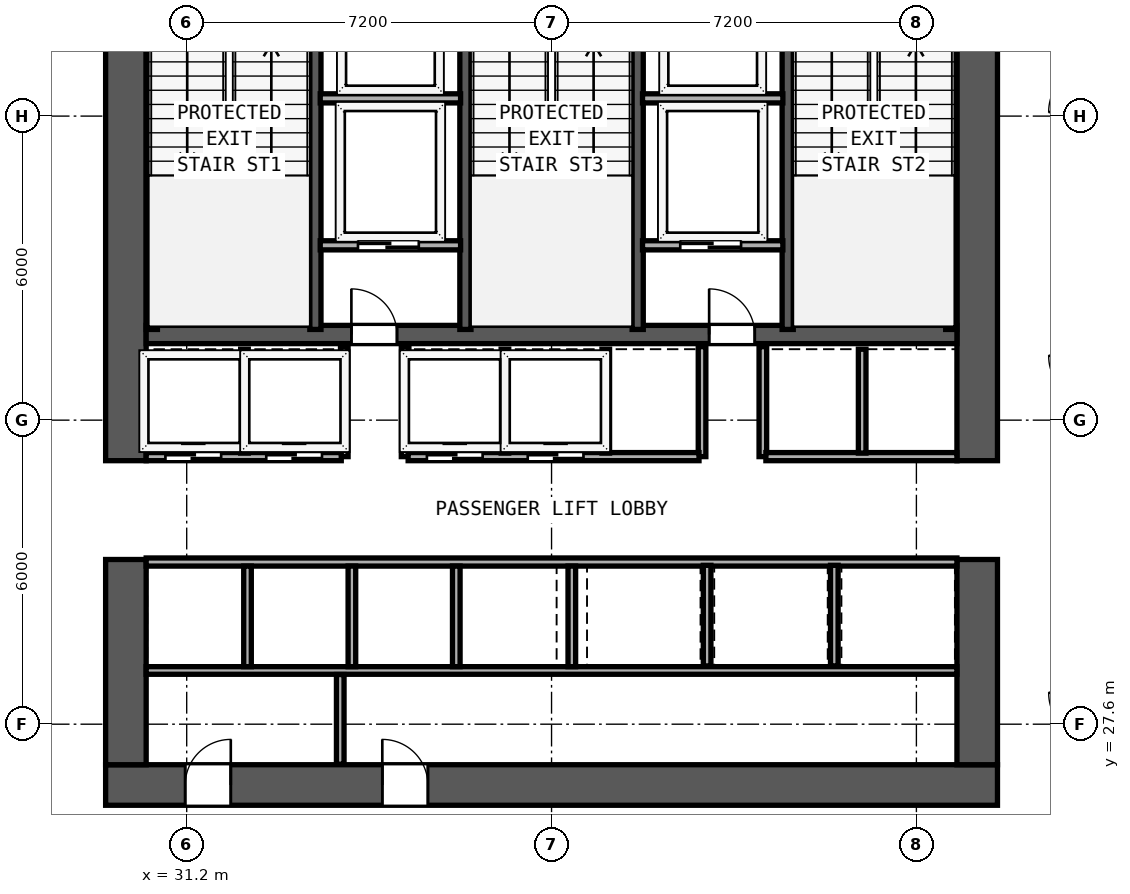
"""IFC4 building model, lengths in metres.
Left out: names, types, materials, properties, quantities, classifications, styles, units other than length and angle.
Written with IfcOpenShell. Run it as: python <this file> out.ifc"""

import sys

from ifc_helpers import new_model, si_unit, direction, frame, frame_2d, origin, place, context, subcontext, project, spatial, rectangle, extrude, element, fill, save


model = new_model("IFC4")
c1 = context("Model", 3, precision=1e-05, world=origin(), true_north=direction((0.0, 1.0)))
c2 = subcontext(c1, "Body", "Model", "MODEL_VIEW")
j1 = project(units=[si_unit("LENGTHUNIT", "METRE"), si_unit("PLANEANGLEUNIT", "RADIAN")], contexts=[c1])
p1 = place(None, origin())
s1 = spatial("IfcSite", under=j1, at=p1, CompositionType="ELEMENT")
p2 = place(p1, origin())
s2 = spatial("IfcBuilding", under=s1, at=p2, CompositionType="ELEMENT")
p3 = place(p2, frame((0.0, 0.0, 59.0)))
s3 = spatial("IfcBuildingStorey", under=s2, at=p3, CompositionType="ELEMENT", Elevation=59.0)
p4 = place(p3, frame((29.6, 26.4, 0.0), z_axis=(0.0, 0.0, 1.0), x_axis=(1.0, 0.0, 0.0)))
e1 = element("IfcWall", 1, at=p4, inside=s3, PredefinedType="SHEAR", context=c2, shape_type="SweptSolid", body=[
    extrude(rectangle(XDim=17.6, YDim=0.8, at=frame_2d((8.8, 0.0))), origin(), (0.0, 0.0, 1.0), 3.6),
])
p5 = place(p4, frame((2.47, 0.0, 0.0), z_axis=(0.0, 0.0, 1.0), x_axis=(-1.0, 0.0, 0.0)))
e2 = element("IfcOpeningElement", 2, at=p5, cuts=e1, PredefinedType="OPENING", context=c2, shape_type="SweptSolid", body=[
    extrude(rectangle(XDim=0.9, YDim=2.1, at=frame_2d((0.45, 1.05))), frame((0.0, 0.41, 0.0), z_axis=(0.0, -1.0, 0.0), x_axis=(1.0, 0.0, 0.0)), (0.0, 0.0, 1.0), 0.82),
])
p6 = place(p4, frame((6.36, 0.0, 0.0), z_axis=(0.0, 0.0, 1.0), x_axis=(-1.0, 0.0, 0.0)))
e3 = element("IfcOpeningElement", 3, at=p6, cuts=e1, PredefinedType="OPENING", context=c2, shape_type="SweptSolid", body=[
    extrude(rectangle(XDim=0.9, YDim=2.1, at=frame_2d((0.45, 1.05))), frame((0.0, 0.41, 0.0), z_axis=(0.0, -1.0, 0.0), x_axis=(1.0, 0.0, 0.0)), (0.0, 0.0, 1.0), 0.82),
])
p7 = place(p3, frame((30.0, 26.8, 0.0), z_axis=(0.0, 0.0, 1.0), x_axis=(0.0, 1.0, 0.0)))
e4 = element("IfcWall", 4, at=p7, inside=s3, PredefinedType="SHEAR", context=c2, shape_type="SweptSolid", body=[
    extrude(rectangle(XDim=4.05, YDim=0.8, at=frame_2d((2.025, 0.0))), origin(), (0.0, 0.0, 1.0), 3.6),
])
p8 = place(p3, frame((30.0, 32.8, 0.0), z_axis=(0.0, 0.0, 1.0), x_axis=(0.0, 1.0, 0.0)))
e5 = element("IfcWall", 5, at=p8, inside=s3, PredefinedType="SHEAR", context=c2, shape_type="SweptSolid", body=[
    extrude(rectangle(XDim=10.0, YDim=0.8, at=frame_2d((5.0, 0.0))), origin(), (0.0, 0.0, 1.0), 3.6),
])
p9 = place(p3, frame((46.8, 26.8, 0.0), z_axis=(0.0, 0.0, 1.0), x_axis=(0.0, 1.0, 0.0)))
e6 = element("IfcWall", 6, at=p9, inside=s3, PredefinedType="SHEAR", context=c2, shape_type="SweptSolid", body=[
    extrude(rectangle(XDim=4.05, YDim=0.8, at=frame_2d((2.025, 0.0))), origin(), (0.0, 0.0, 1.0), 3.6),
])
p10 = place(p3, frame((46.8, 32.8, 0.0), z_axis=(0.0, 0.0, 1.0), x_axis=(0.0, 1.0, 0.0)))
e7 = element("IfcWall", 7, at=p10, inside=s3, PredefinedType="SHEAR", context=c2, shape_type="SweptSolid", body=[
    extrude(rectangle(XDim=10.0, YDim=0.8, at=frame_2d((5.0, 0.0))), origin(), (0.0, 0.0, 1.0), 3.6),
])
p11 = place(p3, frame((30.4, 35.29, 0.0), z_axis=(0.0, 0.0, 1.0), x_axis=(1.0, 0.0, 0.0)))
e8 = element("IfcWall", 8, at=p11, inside=s3, PredefinedType="SHEAR", context=c2, shape_type="SweptSolid", body=[
    extrude(rectangle(XDim=16.0, YDim=0.36, at=frame_2d((8.0, 0.0))), origin(), (0.0, 0.0, 1.0), 3.6),
])
p12 = place(p11, frame((4.95, 0.0, 0.0), z_axis=(0.0, 0.0, 1.0), x_axis=(-1.0, 0.0, 0.0)))
e9 = element("IfcOpeningElement", 9, at=p12, cuts=e8, PredefinedType="OPENING", context=c2, shape_type="SweptSolid", body=[
    extrude(rectangle(XDim=0.9, YDim=2.1, at=frame_2d((0.45, 1.05))), frame((0.0, 0.19, 0.0), z_axis=(0.0, -1.0, 0.0), x_axis=(1.0, 0.0, 0.0)), (0.0, 0.0, 1.0), 0.38),
])
p13 = place(p11, frame((12.01, 0.0, 0.0), z_axis=(0.0, 0.0, 1.0), x_axis=(-1.0, 0.0, 0.0)))
e10 = element("IfcOpeningElement", 10, at=p13, cuts=e8, PredefinedType="OPENING", context=c2, shape_type="SweptSolid", body=[
    extrude(rectangle(XDim=0.9, YDim=2.1, at=frame_2d((0.45, 1.05))), frame((0.0, 0.19, 0.0), z_axis=(0.0, -1.0, 0.0), x_axis=(1.0, 0.0, 0.0)), (0.0, 0.0, 1.0), 0.38),
])
for number, where, z_axis, x_axis in (
    (11, (30.512, 35.39, 0.0), (0.0, 0.0, 1.0), (0.0, 1.0, 0.0)),
    (12, (33.74, 35.39, 0.0), (0.0, 0.0, 1.0), (0.0, 1.0, 0.0)),
    (13, (36.7, 35.39, 0.0), (0.0, 0.0, 1.0), (0.0, 1.0, 0.0)),
    (14, (40.1, 35.39, 0.0), (0.0, 0.0, 1.0), (0.0, 1.0, 0.0)),
    (15, (43.06, 35.39, 0.0), (0.0, 0.0, 1.0), (0.0, 1.0, 0.0)),
    (16, (46.288, 35.39, 0.0), (0.0, 0.0, 1.0), (0.0, 1.0, 0.0)),
):
    element("IfcWall", number, at=place(p3, frame(where, z_axis=z_axis, x_axis=x_axis)), inside=s3, PredefinedType="SHEAR", context=c2, shape_type="SweptSolid", body=[
        extrude(rectangle(XDim=7.41, YDim=0.22, at=frame_2d((3.705, 0.0))), origin(), (0.0, 0.0, 1.0), 3.6),
    ])
for number, where, z_axis, x_axis in (
    (17, (33.835, 39.95, 0.0), (0.0, 0.0, 1.0), (1.0, 0.0, 0.0)),
    (18, (40.195, 39.95, 0.0), (0.0, 0.0, 1.0), (1.0, 0.0, 0.0)),
):
    element("IfcWall", number, at=place(p3, frame(where, z_axis=z_axis, x_axis=x_axis)), inside=s3, PredefinedType="SOLIDWALL", context=c2, shape_type="SweptSolid", body=[
        extrude(rectangle(XDim=2.77, YDim=0.18, at=frame_2d((1.385, 0.0))), origin(), (0.0, 0.0, 1.0), 3.6),
    ])
p14 = place(p3, frame((33.835, 37.05, 0.0), z_axis=(0.0, 0.0, 1.0), x_axis=(1.0, 0.0, 0.0)))
e19 = element("IfcWall", 19, at=p14, inside=s3, PredefinedType="SOLIDWALL", context=c2, shape_type="SweptSolid", body=[
    extrude(rectangle(XDim=2.77, YDim=0.18, at=frame_2d((1.385, 0.0))), origin(), (0.0, 0.0, 1.0), 3.6),
])
p15 = place(p14, frame((1.945, 0.0, 0.0), z_axis=(0.0, 0.0, 1.0), x_axis=(-1.0, 0.0, 0.0)))
e20 = element("IfcOpeningElement", 20, at=p15, cuts=e19, PredefinedType="OPENING", context=c2, shape_type="SweptSolid", body=[
    extrude(rectangle(XDim=1.2, YDim=2.2, at=frame_2d((0.6, 1.1))), frame((0.0, 0.1, 0.0), z_axis=(0.0, -1.0, 0.0), x_axis=(1.0, 0.0, 0.0)), (0.0, 0.0, 1.0), 0.2),
])
for number, where, z_axis, x_axis in (
    (21, (34.31, 32.88, 0.0), (0.0, 0.0, 1.0), (0.0, 1.0, 0.0)),
    (22, (35.51, 32.88, 0.0), (0.0, 0.0, 1.0), (0.0, 1.0, 0.0)),
):
    element("IfcWall", number, at=place(p3, frame(where, z_axis=z_axis, x_axis=x_axis)), inside=s3, PredefinedType="SOLIDWALL", context=c2, shape_type="SweptSolid", body=[
        extrude(rectangle(XDim=2.17, YDim=0.15, at=frame_2d((1.085, 0.0))), origin(), (0.0, 0.0, 1.0), 3.6),
    ])
p16 = place(p3, frame((40.195, 37.05, 0.0), z_axis=(0.0, 0.0, 1.0), x_axis=(1.0, 0.0, 0.0)))
e23 = element("IfcWall", 23, at=p16, inside=s3, PredefinedType="SOLIDWALL", context=c2, shape_type="SweptSolid", body=[
    extrude(rectangle(XDim=2.77, YDim=0.18, at=frame_2d((1.385, 0.0))), origin(), (0.0, 0.0, 1.0), 3.6),
])
p17 = place(p16, frame((1.945, 0.0, 0.0), z_axis=(0.0, 0.0, 1.0), x_axis=(-1.0, 0.0, 0.0)))
e24 = element("IfcOpeningElement", 24, at=p17, cuts=e23, PredefinedType="OPENING", context=c2, shape_type="SweptSolid", body=[
    extrude(rectangle(XDim=1.2, YDim=2.2, at=frame_2d((0.6, 1.1))), frame((0.0, 0.1, 0.0), z_axis=(0.0, -1.0, 0.0), x_axis=(1.0, 0.0, 0.0)), (0.0, 0.0, 1.0), 0.2),
])
for number, where, z_axis, x_axis in (
    (25, (41.37, 32.88, 0.0), (0.0, 0.0, 1.0), (0.0, 1.0, 0.0)),
    (26, (42.57, 32.88, 0.0), (0.0, 0.0, 1.0), (0.0, 1.0, 0.0)),
):
    element("IfcWall", number, at=place(p3, frame(where, z_axis=z_axis, x_axis=x_axis)), inside=s3, PredefinedType="SOLIDWALL", context=c2, shape_type="SweptSolid", body=[
        extrude(rectangle(XDim=2.17, YDim=0.15, at=frame_2d((1.085, 0.0))), origin(), (0.0, 0.0, 1.0), 3.6),
    ])
p18 = place(p3, frame((30.4, 32.88, 0.0), z_axis=(0.0, 0.0, 1.0), x_axis=(1.0, 0.0, 0.0)))
e27 = element("IfcWall", 27, at=p18, inside=s3, PredefinedType="SOLIDWALL", context=c2, shape_type="SweptSolid", body=[
    extrude(rectangle(XDim=3.85, YDim=0.16, at=frame_2d((1.925, 0.0))), origin(), (0.0, 0.0, 1.0), 3.6),
])
p19 = place(p18, frame((1.48, 0.0, 0.0), z_axis=(0.0, 0.0, 1.0), x_axis=(-1.0, 0.0, 0.0)))
e28 = element("IfcOpeningElement", 28, at=p19, cuts=e27, PredefinedType="OPENING", context=c2, shape_type="SweptSolid", body=[
    extrude(rectangle(XDim=1.1, YDim=2.2, at=frame_2d((0.55, 1.1))), frame((0.0, 0.09, 0.0), z_axis=(0.0, -1.0, 0.0), x_axis=(1.0, 0.0, 0.0)), (0.0, 0.0, 1.0), 0.18),
])
p20 = place(p18, frame((3.47, 0.0, 0.0), z_axis=(0.0, 0.0, 1.0), x_axis=(-1.0, 0.0, 0.0)))
e29 = element("IfcOpeningElement", 29, at=p20, cuts=e27, PredefinedType="OPENING", context=c2, shape_type="SweptSolid", body=[
    extrude(rectangle(XDim=1.1, YDim=2.2, at=frame_2d((0.55, 1.1))), frame((0.0, 0.09, 0.0), z_axis=(0.0, -1.0, 0.0), x_axis=(1.0, 0.0, 0.0)), (0.0, 0.0, 1.0), 0.18),
])
p21 = place(p3, frame((35.57, 32.88, 0.0), z_axis=(0.0, 0.0, 1.0), x_axis=(1.0, 0.0, 0.0)))
e30 = element("IfcWall", 30, at=p21, inside=s3, PredefinedType="SOLIDWALL", context=c2, shape_type="SweptSolid", body=[
    extrude(rectangle(XDim=5.74, YDim=0.16, at=frame_2d((2.87, 0.0))), origin(), (0.0, 0.0, 1.0), 3.6),
])
p22 = place(p21, frame((1.47, 0.0, 0.0), z_axis=(0.0, 0.0, 1.0), x_axis=(-1.0, 0.0, 0.0)))
e31 = element("IfcOpeningElement", 31, at=p22, cuts=e30, PredefinedType="OPENING", context=c2, shape_type="SweptSolid", body=[
    extrude(rectangle(XDim=1.1, YDim=2.2, at=frame_2d((0.55, 1.1))), frame((0.0, 0.09, 0.0), z_axis=(0.0, -1.0, 0.0), x_axis=(1.0, 0.0, 0.0)), (0.0, 0.0, 1.0), 0.18),
])
p23 = place(p21, frame((3.46, 0.0, 0.0), z_axis=(0.0, 0.0, 1.0), x_axis=(-1.0, 0.0, 0.0)))
e32 = element("IfcOpeningElement", 32, at=p23, cuts=e30, PredefinedType="OPENING", context=c2, shape_type="SweptSolid", body=[
    extrude(rectangle(XDim=1.1, YDim=2.2, at=frame_2d((0.55, 1.1))), frame((0.0, 0.09, 0.0), z_axis=(0.0, -1.0, 0.0), x_axis=(1.0, 0.0, 0.0)), (0.0, 0.0, 1.0), 0.18),
])
p24 = place(p3, frame((42.63, 32.88, 0.0), z_axis=(0.0, 0.0, 1.0), x_axis=(1.0, 0.0, 0.0)))
e33 = element("IfcWall", 33, at=p24, inside=s3, PredefinedType="SOLIDWALL", context=c2, shape_type="SweptSolid", body=[
    extrude(rectangle(XDim=3.77, YDim=0.16, at=frame_2d((1.885, 0.0))), origin(), (0.0, 0.0, 1.0), 3.6),
])
for number, where, z_axis, x_axis in (
    (34, (32.34, 32.95, 0.0), (0.0, 0.0, 1.0), (0.0, 1.0, 0.0)),
    (35, (37.48, 32.95, 0.0), (0.0, 0.0, 1.0), (0.0, 1.0, 0.0)),
    (36, (39.47, 32.95, 0.0), (0.0, 0.0, 1.0), (0.0, 1.0, 0.0)),
    (37, (44.53, 32.95, 0.0), (0.0, 0.0, 1.0), (0.0, 1.0, 0.0)),
):
    element("IfcWall", number, at=place(p3, frame(where, z_axis=z_axis, x_axis=x_axis)), inside=s3, PredefinedType="SOLIDWALL", context=c2, shape_type="SweptSolid", body=[
        extrude(rectangle(XDim=2.05, YDim=0.15, at=frame_2d((1.025, 0.0))), origin(), (0.0, 0.0, 1.0), 3.6),
    ])
p25 = place(p3, frame((30.4, 30.8, 0.0), z_axis=(0.0, 0.0, 1.0), x_axis=(1.0, 0.0, 0.0)))
e38 = element("IfcWall", 38, at=p25, inside=s3, PredefinedType="SOLIDWALL", context=c2, shape_type="SweptSolid", body=[
    extrude(rectangle(XDim=16.0, YDim=0.16, at=frame_2d((8.0, 0.0))), origin(), (0.0, 0.0, 1.0), 3.6),
])
p26 = place(p3, frame((30.4, 28.66, 0.0), z_axis=(0.0, 0.0, 1.0), x_axis=(1.0, 0.0, 0.0)))
e39 = element("IfcWall", 39, at=p26, inside=s3, PredefinedType="PARTITIONING", context=c2, shape_type="SweptSolid", body=[
    extrude(rectangle(XDim=16.0, YDim=0.15, at=frame_2d((8.0, 0.0))), origin(), (0.0, 0.0, 1.0), 3.6),
])
for number, where, z_axis, x_axis in (
    (40, (32.4, 28.735, 0.0), (0.0, 0.0, 1.0), (0.0, 1.0, 0.0)),
    (41, (34.46, 28.735, 0.0), (0.0, 0.0, 1.0), (0.0, 1.0, 0.0)),
    (42, (36.52, 28.735, 0.0), (0.0, 0.0, 1.0), (0.0, 1.0, 0.0)),
    (43, (38.8, 28.735, 0.0), (0.0, 0.0, 1.0), (0.0, 1.0, 0.0)),
):
    element("IfcWall", number, at=place(p3, frame(where, z_axis=z_axis, x_axis=x_axis)), inside=s3, PredefinedType="SOLIDWALL", context=c2, shape_type="SweptSolid", body=[
        extrude(rectangle(XDim=1.985, YDim=0.15, at=frame_2d((0.992, 0.0))), origin(), (0.0, 0.0, 1.0), 3.6),
    ])
p27 = place(p3, frame((34.23, 26.81, 0.0), z_axis=(0.0, 0.0, 1.0), x_axis=(0.0, 1.0, 0.0)))
e44 = element("IfcWall", 44, at=p27, inside=s3, PredefinedType="PARTITIONING", context=c2, shape_type="SweptSolid", body=[
    extrude(rectangle(XDim=1.77, YDim=0.15, at=frame_2d((0.885, 0.0))), origin(), (0.0, 0.0, 1.0), 3.6),
])
for number, where, z_axis, x_axis in (
    (45, (41.47, 28.75, 0.0), (0.0, 0.0, 1.0), (0.0, 1.0, 0.0)),
    (46, (43.98, 28.75, 0.0), (0.0, 0.0, 1.0), (0.0, 1.0, 0.0)),
):
    element("IfcWall", number, at=place(p3, frame(where, z_axis=z_axis, x_axis=x_axis)), inside=s3, PredefinedType="SOLIDWALL", context=c2, shape_type="SweptSolid", body=[
        extrude(rectangle(XDim=1.985, YDim=0.15, at=frame_2d((0.993, 0.0))), origin(), (0.0, 0.0, 1.0), 3.6),
    ])
p28 = place(p15, origin())
e47 = element("IfcDoor", 47, at=p28, inside=s3, OperationType="SLIDING_TO_RIGHT", PredefinedType="DOOR", context=c2, shape_type="SweptSolid", body=[
    extrude(rectangle(XDim=1.2, YDim=2.2, at=frame_2d((0.6, 1.1))), frame((0.0, 0.025, 0.0), z_axis=(0.0, -1.0, 0.0), x_axis=(1.0, 0.0, 0.0)), (0.0, 0.0, 1.0), 0.05),
])
fill(e20, e47)
p29 = place(p12, origin())
e48 = element("IfcDoor", 48, at=p29, inside=s3, OperationType="SINGLE_SWING_RIGHT", PredefinedType="DOOR", context=c2, shape_type="SweptSolid", body=[
    extrude(rectangle(XDim=0.9, YDim=2.1, at=frame_2d((0.45, 1.05))), frame((0.0, 0.025, 0.0), z_axis=(0.0, -1.0, 0.0), x_axis=(1.0, 0.0, 0.0)), (0.0, 0.0, 1.0), 0.05),
])
fill(e9, e48)
p30 = place(p17, origin())
e49 = element("IfcDoor", 49, at=p30, inside=s3, OperationType="SLIDING_TO_RIGHT", PredefinedType="DOOR", context=c2, shape_type="SweptSolid", body=[
    extrude(rectangle(XDim=1.2, YDim=2.2, at=frame_2d((0.6, 1.1))), frame((0.0, 0.025, 0.0), z_axis=(0.0, -1.0, 0.0), x_axis=(1.0, 0.0, 0.0)), (0.0, 0.0, 1.0), 0.05),
])
fill(e24, e49)
p31 = place(p13, origin())
e50 = element("IfcDoor", 50, at=p31, inside=s3, OperationType="SINGLE_SWING_RIGHT", PredefinedType="DOOR", context=c2, shape_type="SweptSolid", body=[
    extrude(rectangle(XDim=0.9, YDim=2.1, at=frame_2d((0.45, 1.05))), frame((0.0, 0.025, 0.0), z_axis=(0.0, -1.0, 0.0), x_axis=(1.0, 0.0, 0.0)), (0.0, 0.0, 1.0), 0.05),
])
fill(e10, e50)
p32 = place(p19, origin())
e51 = element("IfcDoor", 51, at=p32, inside=s3, OperationType="SLIDING_TO_LEFT", PredefinedType="DOOR", context=c2, shape_type="SweptSolid", body=[
    extrude(rectangle(XDim=1.1, YDim=2.2, at=frame_2d((0.55, 1.1))), frame((0.0, 0.025, 0.0), z_axis=(0.0, -1.0, 0.0), x_axis=(1.0, 0.0, 0.0)), (0.0, 0.0, 1.0), 0.05),
])
fill(e28, e51)
p33 = place(p20, origin())
e52 = element("IfcDoor", 52, at=p33, inside=s3, OperationType="SLIDING_TO_LEFT", PredefinedType="DOOR", context=c2, shape_type="SweptSolid", body=[
    extrude(rectangle(XDim=1.1, YDim=2.2, at=frame_2d((0.55, 1.1))), frame((0.0, 0.025, 0.0), z_axis=(0.0, -1.0, 0.0), x_axis=(1.0, 0.0, 0.0)), (0.0, 0.0, 1.0), 0.05),
])
fill(e29, e52)
p34 = place(p22, origin())
e53 = element("IfcDoor", 53, at=p34, inside=s3, OperationType="SLIDING_TO_LEFT", PredefinedType="DOOR", context=c2, shape_type="SweptSolid", body=[
    extrude(rectangle(XDim=1.1, YDim=2.2, at=frame_2d((0.55, 1.1))), frame((0.0, 0.025, 0.0), z_axis=(0.0, -1.0, 0.0), x_axis=(1.0, 0.0, 0.0)), (0.0, 0.0, 1.0), 0.05),
])
fill(e31, e53)
p35 = place(p23, origin())
e54 = element("IfcDoor", 54, at=p35, inside=s3, OperationType="SLIDING_TO_LEFT", PredefinedType="DOOR", context=c2, shape_type="SweptSolid", body=[
    extrude(rectangle(XDim=1.1, YDim=2.2, at=frame_2d((0.55, 1.1))), frame((0.0, 0.025, 0.0), z_axis=(0.0, -1.0, 0.0), x_axis=(1.0, 0.0, 0.0)), (0.0, 0.0, 1.0), 0.05),
])
fill(e32, e54)
p36 = place(p5, origin())
e55 = element("IfcDoor", 55, at=p36, inside=s3, OperationType="SINGLE_SWING_LEFT", PredefinedType="DOOR", context=c2, shape_type="SweptSolid", body=[
    extrude(rectangle(XDim=0.9, YDim=2.1, at=frame_2d((0.45, 1.05))), frame((0.0, -0.195, 0.0), z_axis=(0.0, -1.0, 0.0), x_axis=(1.0, 0.0, 0.0)), (0.0, 0.0, 1.0), 0.05),
])
fill(e2, e55)
p37 = place(p6, origin())
e56 = element("IfcDoor", 56, at=p37, inside=s3, OperationType="SINGLE_SWING_RIGHT", PredefinedType="DOOR", context=c2, shape_type="SweptSolid", body=[
    extrude(rectangle(XDim=0.9, YDim=2.1, at=frame_2d((0.45, 1.05))), frame((0.0, -0.195, 0.0), z_axis=(0.0, -1.0, 0.0), x_axis=(1.0, 0.0, 0.0)), (0.0, 0.0, 1.0), 0.05),
])
fill(e3, e56)
save(model, sys.argv[1])
